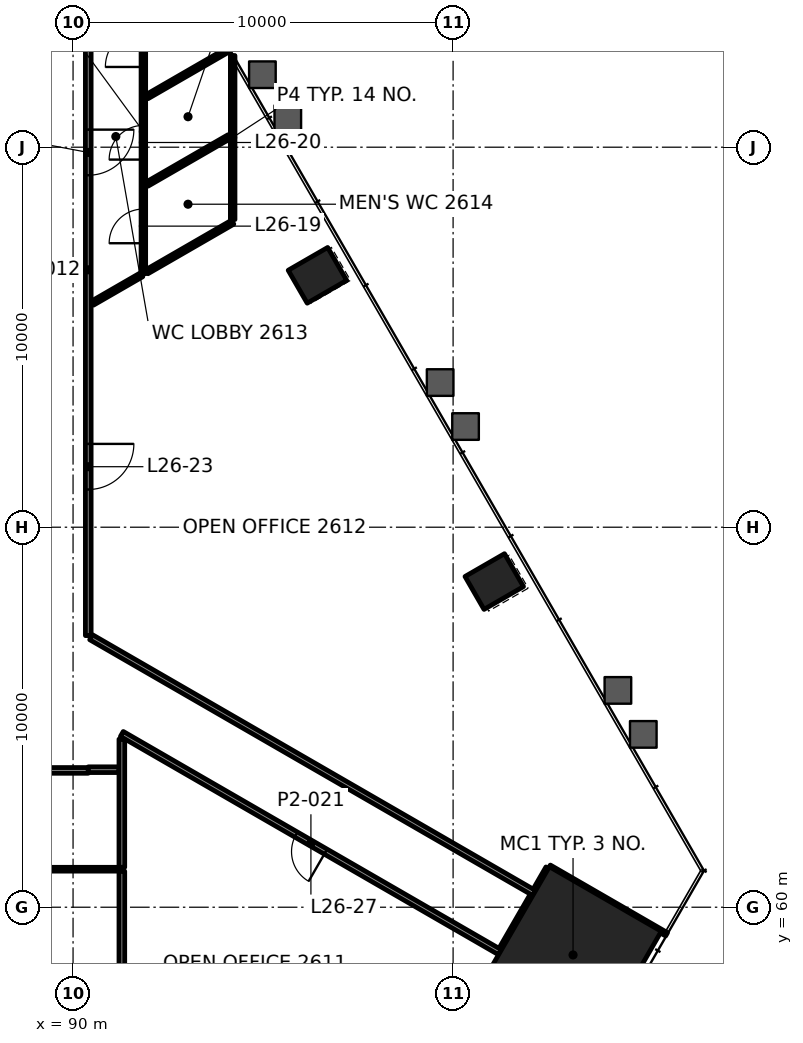
"""IFC4 building model, lengths in metres.
Left out: names, types, materials, properties, quantities, classifications, styles, units other than length and angle.
Written with IfcOpenShell. Run it as: python <this file> out.ifc"""

import sys

from ifc_helpers import new_model, si_unit, direction, frame, frame_2d, origin, origin_2d, place, context, subcontext, project, spatial, rectangle, extrude, element, fill, save


model = new_model("IFC4")
c1 = context("Model", 3, precision=1e-05, world=origin(), true_north=direction((0.0, 1.0)))
c2 = subcontext(c1, "Body", "Model", "MODEL_VIEW")
j1 = project(units=[si_unit("LENGTHUNIT", "METRE"), si_unit("PLANEANGLEUNIT", "RADIAN")], contexts=[c1])
p1 = place(None, origin())
s1 = spatial("IfcSite", under=j1, at=p1, CompositionType="ELEMENT")
p2 = place(p1, origin())
s2 = spatial("IfcBuilding", under=s1, at=p2, CompositionType="ELEMENT")
p3 = place(p2, frame((0.0, 0.0, 115.6)))
s3 = spatial("IfcBuildingStorey", under=s2, at=p3, CompositionType="ELEMENT", Elevation=115.6)
p4 = place(p3, frame((103.156, 58.744, 0.0), z_axis=(0.0, 0.0, 1.0), x_axis=(0.5, 0.866025403784, 0.0)))
e1 = element("IfcColumn", 1, at=p4, inside=s3, PredefinedType="COLUMN", context=c2, shape_type="SweptSolid", body=[
    extrude(rectangle(XDim=3.4, YDim=3.4, at=origin_2d()), origin(), (0.0, 0.0, 1.0), 4.2),
])
for number, where, z_axis, x_axis in (
    (2, (101.083, 68.57, -0.0), (0.0, 0.0, 1.0), (-0.5, 0.866, 0.0)),
    (3, (96.431, 76.628, -0.0), (0.0, 0.0, 1.0), (-0.5, 0.866, 0.0)),
):
    element("IfcColumn", number, at=place(p3, frame(where, z_axis=z_axis, x_axis=x_axis)), inside=s3, PredefinedType="COLUMN", context=c2, shape_type="SweptSolid", body=[
        extrude(rectangle(XDim=1.0, YDim=1.2, at=origin_2d()), origin(), (0.0, 0.0, 1.0), 4.2),
    ])
p5 = place(p3, frame((57.751, 61.0, 0.0), z_axis=(0.0, 0.0, 1.0), x_axis=(1.0, 0.0, 0.0)))
e4 = element("IfcWall", 4, at=p5, inside=s3, PredefinedType="PARTITIONING", context=c2, shape_type="SweptSolid", body=[
    extrude(rectangle(XDim=33.533, YDim=0.1, at=frame_2d((16.766, 0.0))), origin(), (0.0, 0.0, 1.0), 3.4),
])
p6 = place(p5, frame((3.572, 0.0, 0.0)))
e5 = element("IfcOpeningElement", 5, at=p6, cuts=e4, PredefinedType="OPENING", context=c2, shape_type="SweptSolid", body=[
    extrude(rectangle(XDim=1.0, YDim=2.1, at=frame_2d((0.5, 1.05))), frame((0.0, 0.06, 0.0), z_axis=(0.0, -1.0, 0.0), x_axis=(1.0, 0.0, 0.0)), (0.0, 0.0, 1.0), 0.12),
])
p7 = place(p5, frame((9.822, 0.0, 0.0)))
e6 = element("IfcOpeningElement", 6, at=p7, cuts=e4, PredefinedType="OPENING", context=c2, shape_type="SweptSolid", body=[
    extrude(rectangle(XDim=0.9, YDim=2.1, at=frame_2d((0.45, 1.05))), frame((0.0, 0.06, 0.0), z_axis=(0.0, -1.0, 0.0), x_axis=(1.0, 0.0, 0.0)), (0.0, 0.0, 1.0), 0.12),
])
p8 = place(p5, frame((14.472, 0.0, 0.0)))
e7 = element("IfcOpeningElement", 7, at=p8, cuts=e4, PredefinedType="OPENING", context=c2, shape_type="SweptSolid", body=[
    extrude(rectangle(XDim=0.9, YDim=2.1, at=frame_2d((0.45, 1.05))), frame((0.0, 0.06, 0.0), z_axis=(0.0, -1.0, 0.0), x_axis=(1.0, 0.0, 0.0)), (0.0, 0.0, 1.0), 0.12),
])
p9 = place(p5, frame((19.124, 0.0, 0.0)))
e8 = element("IfcOpeningElement", 8, at=p9, cuts=e4, PredefinedType="OPENING", context=c2, shape_type="SweptSolid", body=[
    extrude(rectangle(XDim=0.9, YDim=2.1, at=frame_2d((0.45, 1.05))), frame((0.0, 0.06, 0.0), z_axis=(0.0, -1.0, 0.0), x_axis=(1.0, 0.0, 0.0)), (0.0, 0.0, 1.0), 0.12),
])
p10 = place(p5, frame((24.361, 0.0, 0.0)))
e9 = element("IfcOpeningElement", 9, at=p10, cuts=e4, PredefinedType="OPENING", context=c2, shape_type="SweptSolid", body=[
    extrude(rectangle(XDim=0.9, YDim=2.1, at=frame_2d((0.45, 1.05))), frame((0.0, 0.06, 0.0), z_axis=(0.0, -1.0, 0.0), x_axis=(1.0, 0.0, 0.0)), (0.0, 0.0, 1.0), 0.12),
])
p11 = place(p5, frame((30.073, 0.0, 0.0)))
e10 = element("IfcOpeningElement", 10, at=p11, cuts=e4, PredefinedType="OPENING", context=c2, shape_type="SweptSolid", body=[
    extrude(rectangle(XDim=0.9, YDim=2.1, at=frame_2d((0.45, 1.05))), frame((0.0, 0.06, 0.0), z_axis=(0.0, -1.0, 0.0), x_axis=(1.0, 0.0, 0.0)), (0.0, 0.0, 1.0), 0.12),
])
p12 = place(p3, frame((90.399, 63.6, 0.0), z_axis=(0.0, 0.0, 1.0), x_axis=(-1.0, 0.0, 0.0)))
e11 = element("IfcWall", 11, at=p12, inside=s3, PredefinedType="PARTITIONING", context=c2, shape_type="SweptSolid", body=[
    extrude(rectangle(XDim=30.799, YDim=0.15, at=frame_2d((15.4, 0.0))), origin(), (0.0, 0.0, 1.0), 3.4),
])
p13 = place(p12, frame((4.975, 0.0, 0.0)))
e12 = element("IfcOpeningElement", 12, at=p13, cuts=e11, PredefinedType="OPENING", context=c2, shape_type="SweptSolid", body=[
    extrude(rectangle(XDim=1.0, YDim=2.1, at=frame_2d((0.5, 1.05))), frame((0.0, 0.085, 0.0), z_axis=(0.0, -1.0, 0.0), x_axis=(1.0, 0.0, 0.0)), (0.0, 0.0, 1.0), 0.17),
])
p14 = place(p12, frame((17.226, 0.0, 0.0)))
e13 = element("IfcOpeningElement", 13, at=p14, cuts=e11, PredefinedType="OPENING", context=c2, shape_type="SweptSolid", body=[
    extrude(rectangle(XDim=1.0, YDim=2.1, at=frame_2d((0.5, 1.05))), frame((0.0, 0.085, 0.0), z_axis=(0.0, -1.0, 0.0), x_axis=(1.0, 0.0, 0.0)), (0.0, 0.0, 1.0), 0.17),
])
p15 = place(p12, frame((27.151, 0.0, 0.0)))
e14 = element("IfcOpeningElement", 14, at=p15, cuts=e11, PredefinedType="OPENING", context=c2, shape_type="SweptSolid", body=[
    extrude(rectangle(XDim=1.0, YDim=2.1, at=frame_2d((0.5, 1.05))), frame((0.0, 0.085, 0.0), z_axis=(0.0, -1.0, 0.0), x_axis=(1.0, 0.0, 0.0)), (0.0, 0.0, 1.0), 0.17),
])
p16 = place(p3, frame((90.4, 63.619, 0.0), z_axis=(0.0, 0.0, 1.0), x_axis=(1.0, 0.0, 0.0)))
e15 = element("IfcWall", 15, at=p16, inside=s3, PredefinedType="PARTITIONING", context=c2, shape_type="SweptSolid", body=[
    extrude(rectangle(XDim=0.809, YDim=0.15, at=frame_2d((0.404, 0.0))), origin(), (0.0, 0.0, 1.0), 3.4),
])
p17 = place(p3, frame((90.51, 75.896, 0.0), z_axis=(0.0, 0.0, 1.0), x_axis=(0.866055123991, 0.49994851956, 0.0)))
e16 = element("IfcWall", 16, at=p17, inside=s3, PredefinedType="PARTITIONING", context=c2, shape_type="SweptSolid", body=[
    extrude(rectangle(XDim=1.496, YDim=0.12, at=frame_2d((0.748, 0.0))), origin(), (0.0, 0.0, 1.0), 3.4),
])
p18 = place(p3, frame((91.945, 79.027, 0.0), z_axis=(0.0, 0.0, 1.0), x_axis=(0.86603079437, 0.499990663115, 0.0)))
e17 = element("IfcWall", 17, at=p18, inside=s3, PredefinedType="PARTITIONING", context=c2, shape_type="SweptSolid", body=[
    extrude(rectangle(XDim=2.495, YDim=0.12, at=frame_2d((1.248, 0.0))), origin(), (0.0, 0.0, 1.0), 3.4),
])
p19 = place(p3, frame((91.945, 81.329, 0.0), z_axis=(0.0, 0.0, 1.0), x_axis=(0.866024239756, 0.50000201615, 0.0)))
e18 = element("IfcWall", 18, at=p19, inside=s3, PredefinedType="PARTITIONING", context=c2, shape_type="SweptSolid", body=[
    extrude(rectangle(XDim=2.495, YDim=0.12, at=frame_2d((1.247, 0.0))), origin(), (0.0, 0.0, 1.0), 3.165),
])
p20 = place(p3, frame((101.272, 58.88, 0.0), z_axis=(0.0, 0.0, 1.0), x_axis=(0.500038426333, 0.866003217194, 0.0)))
e19 = element("IfcWall", 19, at=p20, inside=s3, PredefinedType="PARTITIONING", context=c2, shape_type="SweptSolid", body=[
    extrude(rectangle(XDim=1.65, YDim=0.15, at=frame_2d((0.825, 0.0))), origin(), (0.0, 0.0, 1.0), 3.247),
])
p21 = place(p3, frame((94.2, 78.096, 0.0), z_axis=(0.0, 0.0, 1.0), x_axis=(0.0, 1.0, 0.0)))
e20 = element("IfcWall", 20, at=p21, inside=s3, PredefinedType="PARTITIONING", context=c2, shape_type="SweptSolid", body=[
    extrude(rectangle(XDim=4.316, YDim=0.12, at=frame_2d((2.158, 0.0))), origin(), (0.0, 0.0, 1.0), 3.165),
])
p22 = place(p3, frame((91.85, 76.67, 0.0), z_axis=(0.0, 0.0, 1.0), x_axis=(0.0, 1.0, 0.0)))
e21 = element("IfcWall", 21, at=p22, inside=s3, PredefinedType="PARTITIONING", context=c2, shape_type="SweptSolid", body=[
    extrude(rectangle(XDim=7.481, YDim=0.12, at=frame_2d((3.741, 0.0))), origin(), (0.0, 0.0, 1.0), 3.4),
])
p23 = place(p22, frame((0.803, 0.0, 0.0)))
e22 = element("IfcOpeningElement", 22, at=p23, cuts=e21, PredefinedType="OPENING", context=c2, shape_type="SweptSolid", body=[
    extrude(rectangle(XDim=0.9, YDim=2.1, at=frame_2d((0.45, 1.05))), frame((0.0, 0.07, 0.0), z_axis=(0.0, -1.0, 0.0), x_axis=(1.0, 0.0, 0.0)), (0.0, 0.0, 1.0), 0.14),
])
p24 = place(p22, frame((3.004, 0.0, 0.0)))
e23 = element("IfcOpeningElement", 23, at=p24, cuts=e21, PredefinedType="OPENING", context=c2, shape_type="SweptSolid", body=[
    extrude(rectangle(XDim=0.9, YDim=2.1, at=frame_2d((0.45, 1.05))), frame((0.0, 0.07, 0.0), z_axis=(0.0, -1.0, 0.0), x_axis=(1.0, 0.0, 0.0)), (0.0, 0.0, 1.0), 0.14),
])
p25 = place(p22, frame((5.441, 0.0, 0.0)))
e24 = element("IfcOpeningElement", 24, at=p25, cuts=e21, PredefinedType="OPENING", context=c2, shape_type="SweptSolid", body=[
    extrude(rectangle(XDim=1.0, YDim=2.1, at=frame_2d((0.5, 1.05))), frame((0.0, 0.07, 0.0), z_axis=(0.0, -1.0, 0.0), x_axis=(1.0, 0.0, 0.0)), (0.0, 0.0, 1.0), 0.14),
])
p26 = place(p3, frame((91.284, 54.666, 0.0), z_axis=(0.0, 0.0, 1.0), x_axis=(0.0, 1.0, 0.0)))
e25 = element("IfcWall", 25, at=p26, inside=s3, PredefinedType="PARTITIONING", context=c2, shape_type="SweptSolid", body=[
    extrude(rectangle(XDim=6.284, YDim=0.15, at=frame_2d((3.142, 0.0))), origin(), (0.0, 0.0, 1.0), 3.165),
])
p27 = place(p3, frame((90.4, 86.399, 0.0), z_axis=(0.0, 0.0, 1.0), x_axis=(0.0, -1.0, 0.0)))
e26 = element("IfcWall", 26, at=p27, inside=s3, PredefinedType="PARTITIONING", context=c2, shape_type="SweptSolid", body=[
    extrude(rectangle(XDim=19.251, YDim=0.15, at=frame_2d((9.626, 0.0))), origin(), (0.0, 0.0, 1.0), 3.4),
])
p28 = place(p27, frame((5.937, 0.0, 0.0)))
e27 = element("IfcOpeningElement", 27, at=p28, cuts=e26, PredefinedType="OPENING", context=c2, shape_type="SweptSolid", body=[
    extrude(rectangle(XDim=1.2, YDim=2.1, at=frame_2d((0.6, 1.05))), frame((0.0, 0.085, 0.0), z_axis=(0.0, -1.0, 0.0), x_axis=(1.0, 0.0, 0.0)), (0.0, 0.0, 1.0), 0.17),
])
p29 = place(p27, frame((14.207, 0.0, 0.0)))
e28 = element("IfcOpeningElement", 28, at=p29, cuts=e26, PredefinedType="OPENING", context=c2, shape_type="SweptSolid", body=[
    extrude(rectangle(XDim=1.2, YDim=2.1, at=frame_2d((0.6, 1.05))), frame((0.0, 0.085, 0.0), z_axis=(0.0, -1.0, 0.0), x_axis=(1.0, 0.0, 0.0)), (0.0, 0.0, 1.0), 0.17),
])
p30 = place(p3, frame((105.617, 59.286, 0.0), z_axis=(0.0, 0.0, 1.0), x_axis=(-0.866043951586, 0.49996787289, 0.0)))
e29 = element("IfcWall", 29, at=p30, inside=s3, PredefinedType="PARTITIONING", context=c2, shape_type="SweptSolid", body=[
    extrude(rectangle(XDim=3.559, YDim=0.1, at=frame_2d((1.78, 0.0))), origin(), (0.0, 0.0, 1.0), 3.4),
])
p31 = place(p3, frame((102.134, 60.374, 0.0), z_axis=(0.0, 0.0, 1.0), x_axis=(-0.86602824724, 0.499995074959, 0.0)))
e30 = element("IfcWall", 30, at=p31, inside=s3, PredefinedType="PARTITIONING", context=c2, shape_type="SweptSolid", body=[
    extrude(rectangle(XDim=13.463, YDim=0.15, at=frame_2d((6.731, 0.0))), origin(), (0.0, 0.0, 1.0), 3.4),
])
p32 = place(p3, frame((101.234, 58.815, 0.0), z_axis=(0.0, 0.0, 1.0), x_axis=(-0.866028466704, 0.49999469483, 0.0)))
e31 = element("IfcWall", 31, at=p32, inside=s3, PredefinedType="PARTITIONING", context=c2, shape_type="SweptSolid", body=[
    extrude(rectangle(XDim=11.489, YDim=0.15, at=frame_2d((5.744, 0.0))), origin(), (0.0, 0.0, 1.0), 3.247),
])
p33 = place(p32, frame((5.294, 0.0, 0.0)))
e32 = element("IfcOpeningElement", 32, at=p33, cuts=e31, PredefinedType="OPENING", context=c2, shape_type="SweptSolid", body=[
    extrude(rectangle(XDim=0.9, YDim=2.1, at=frame_2d((0.45, 1.05))), frame((0.0, 0.085, 0.0), z_axis=(0.0, -1.0, 0.0), x_axis=(1.0, 0.0, 0.0)), (0.0, 0.0, 1.0), 0.17),
])
p34 = place(p3, frame((91.284, 61.05, 0.0), z_axis=(0.0, 0.0, 1.0), x_axis=(0.0, 1.0, 0.0)))
e33 = element("IfcWall", 33, at=p34, inside=s3, PredefinedType="PARTITIONING", context=c2, shape_type="SweptSolid", body=[
    extrude(rectangle(XDim=3.373, YDim=0.15, at=frame_2d((1.686, 0.0))), origin(), (0.0, 0.0, 1.0), 3.247),
])
p35 = place(p3, frame((91.94, 76.722, 0.0), z_axis=(0.0, 0.0, 1.0), x_axis=(0.866006422342, 0.500032875382, 0.0)))
e34 = element("IfcWall", 34, at=p35, inside=s3, PredefinedType="PARTITIONING", context=c2, shape_type="SweptSolid", body=[
    extrude(rectangle(XDim=2.61, YDim=0.12, at=frame_2d((1.305, 0.0))), origin(), (0.0, 0.0, 1.0), 3.4),
])
p36 = place(p3, frame((102.172, 60.438, 0.0), z_axis=(0.0, 0.0, 1.0), x_axis=(0.499994068514, 0.866028828302, 0.0)))
e35 = element("IfcWall", 35, at=p36, inside=s3, PredefinedType="PARTITIONING", context=c2, shape_type="SweptSolid", body=[
    extrude(rectangle(XDim=0.674, YDim=0.15, at=frame_2d((0.337, 0.0))), origin(), (0.0, 0.0, 1.0), 3.4),
])
p37 = place(p23, origin())
e36 = element("IfcDoor", 36, at=p37, inside=s3, OperationType="SINGLE_SWING_LEFT", PredefinedType="DOOR", context=c2, shape_type="SweptSolid", body=[
    extrude(rectangle(XDim=0.9, YDim=2.1, at=frame_2d((0.45, 1.05))), frame((0.0, 0.025, 0.0), z_axis=(0.0, -1.0, 0.0), x_axis=(1.0, 0.0, 0.0)), (0.0, 0.0, 1.0), 0.05),
])
fill(e22, e36)
p38 = place(p24, origin())
e37 = element("IfcDoor", 37, at=p38, inside=s3, OperationType="SINGLE_SWING_RIGHT", PredefinedType="DOOR", context=c2, shape_type="SweptSolid", body=[
    extrude(rectangle(XDim=0.9, YDim=2.1, at=frame_2d((0.45, 1.05))), frame((0.0, 0.025, 0.0), z_axis=(0.0, -1.0, 0.0), x_axis=(1.0, 0.0, 0.0)), (0.0, 0.0, 1.0), 0.05),
])
fill(e23, e37)
p39 = place(p25, origin())
e38 = element("IfcDoor", 38, at=p39, inside=s3, OperationType="SINGLE_SWING_LEFT", PredefinedType="DOOR", context=c2, shape_type="SweptSolid", body=[
    extrude(rectangle(XDim=1.0, YDim=2.1, at=frame_2d((0.5, 1.05))), frame((0.0, 0.025, 0.0), z_axis=(0.0, -1.0, 0.0), x_axis=(1.0, 0.0, 0.0)), (0.0, 0.0, 1.0), 0.05),
])
fill(e24, e38)
p40 = place(p28, origin())
e39 = element("IfcDoor", 39, at=p40, inside=s3, OperationType="DOUBLE_DOOR_SINGLE_SWING", PredefinedType="DOOR", context=c2, shape_type="SweptSolid", body=[
    extrude(rectangle(XDim=1.2, YDim=2.1, at=frame_2d((0.6, 1.05))), frame((0.0, 0.025, 0.0), z_axis=(0.0, -1.0, 0.0), x_axis=(1.0, 0.0, 0.0)), (0.0, 0.0, 1.0), 0.05),
])
fill(e27, e39)
p41 = place(p29, origin())
e40 = element("IfcDoor", 40, at=p41, inside=s3, OperationType="DOUBLE_DOOR_SINGLE_SWING", PredefinedType="DOOR", context=c2, shape_type="SweptSolid", body=[
    extrude(rectangle(XDim=1.2, YDim=2.1, at=frame_2d((0.6, 1.05))), frame((0.0, 0.025, 0.0), z_axis=(0.0, -1.0, 0.0), x_axis=(1.0, 0.0, 0.0)), (0.0, 0.0, 1.0), 0.05),
])
fill(e28, e40)
p42 = place(p33, origin())
e41 = element("IfcDoor", 41, at=p42, inside=s3, OperationType="SINGLE_SWING_RIGHT", PredefinedType="DOOR", context=c2, shape_type="SweptSolid", body=[
    extrude(rectangle(XDim=0.9, YDim=2.1, at=frame_2d((0.45, 1.05))), frame((0.0, 0.025, 0.0), z_axis=(0.0, -1.0, 0.0), x_axis=(1.0, 0.0, 0.0)), (0.0, 0.0, 1.0), 0.05),
])
fill(e32, e41)
save(model, sys.argv[1])
